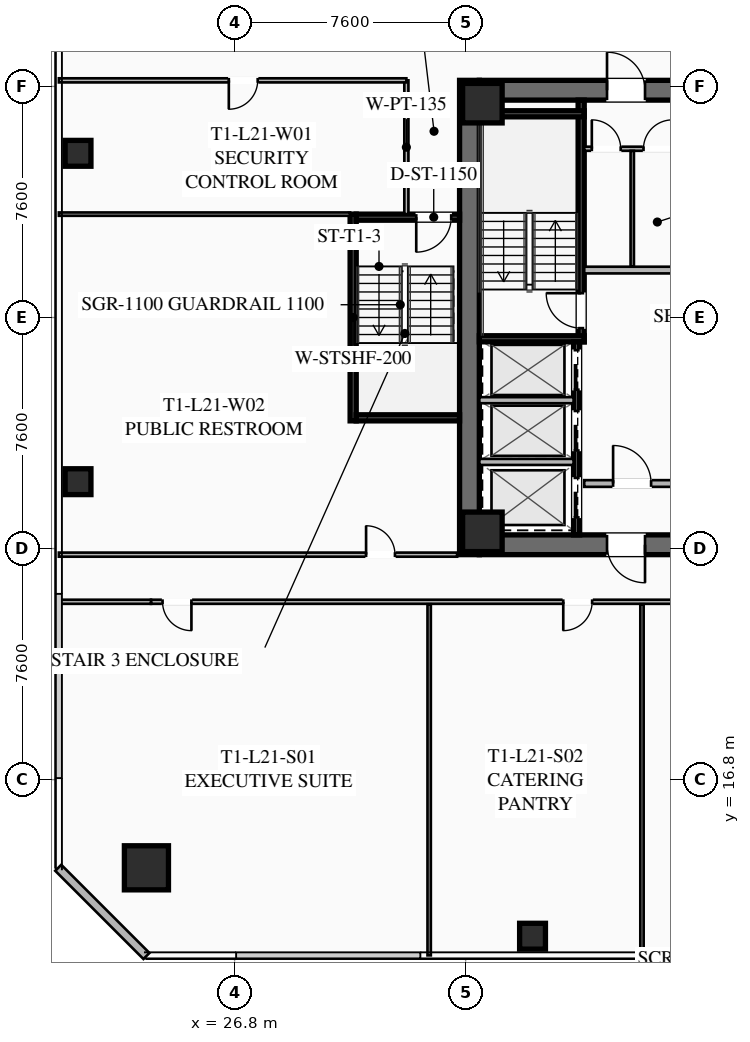
"""IFC4 building model, lengths in metres.
Left out: names, types, materials, properties, quantities, classifications, styles, units other than length and angle.
Written with IfcOpenShell. Run it as: python <this file> out.ifc"""

import sys

from ifc_helpers import new_model, si_unit, direction, frame, frame_2d, origin, origin_2d, place, context, subcontext, project, spatial, rectangle, hollow_rectangle, extrude, element, fill, save


model = new_model("IFC4")
c1 = context("Model", 3, precision=1e-05, world=origin(), true_north=direction((0.0, 1.0)))
c2 = subcontext(c1, "Body", "Model", "MODEL_VIEW")
j1 = project(units=[si_unit("LENGTHUNIT", "METRE"), si_unit("PLANEANGLEUNIT", "RADIAN")], contexts=[c1])
p1 = place(None, origin())
s1 = spatial("IfcSite", under=j1, at=p1, CompositionType="ELEMENT")
p2 = place(p1, origin())
s2 = spatial("IfcBuilding", under=s1, at=p2, CompositionType="ELEMENT")
p3 = place(p2, frame((0.0, 0.0, 81.4)))
s3 = spatial("IfcBuildingStorey", under=s2, at=p3, CompositionType="ELEMENT", Elevation=81.4)
p4 = place(p3, frame((34.525, 24.2, 0.0), z_axis=(0.0, 0.0, 1.0), x_axis=(0.0, 1.0, 0.0)))
e1 = element("IfcWall", 1, at=p4, inside=s3, PredefinedType="SHEAR", context=c2, shape_type="SweptSolid", body=[
    extrude(rectangle(XDim=15.6, YDim=0.65, at=frame_2d((7.8, 0.0))), origin(), (0.0, 0.0, 1.0), 3.55),
])
p5 = place(p3, frame((49.15, 24.525, 0.0), z_axis=(0.0, 0.0, 1.0), x_axis=(-1.0, 0.0, 0.0)))
e2 = element("IfcWall", 2, at=p5, inside=s3, PredefinedType="SHEAR", context=c2, shape_type="SweptSolid", body=[
    extrude(rectangle(XDim=14.3, YDim=0.65, at=frame_2d((7.15, 0.0))), origin(), (0.0, 0.0, 1.0), 3.55),
])
p6 = place(p5, frame((8.85, 0.0, 0.0)))
e3 = element("IfcOpeningElement", 3, at=p6, cuts=e2, PredefinedType="OPENING", context=c2, shape_type="SweptSolid", body=[
    extrude(rectangle(XDim=1.25, YDim=2.25, at=frame_2d((0.625, 1.125))), frame((0.0, 0.335, 0.0), z_axis=(0.0, -1.0, 0.0), x_axis=(1.0, 0.0, 0.0)), (0.0, 0.0, 1.0), 0.67),
])
p7 = place(p5, frame((3.8, 0.0, 0.0)))
e4 = element("IfcOpeningElement", 4, at=p7, cuts=e2, PredefinedType="OPENING", context=c2, shape_type="SweptSolid", body=[
    extrude(rectangle(XDim=1.25, YDim=2.25, at=frame_2d((0.625, 1.125))), frame((0.0, 0.335, 0.0), z_axis=(0.0, -1.0, 0.0), x_axis=(1.0, 0.0, 0.0)), (0.0, 0.0, 1.0), 0.67),
])
p8 = place(p3, frame((34.85, 39.475, 0.0), z_axis=(0.0, 0.0, 1.0), x_axis=(1.0, 0.0, 0.0)))
e5 = element("IfcWall", 5, at=p8, inside=s3, PredefinedType="SHEAR", context=c2, shape_type="SweptSolid", body=[
    extrude(rectangle(XDim=14.3, YDim=0.65, at=frame_2d((7.15, 0.0))), origin(), (0.0, 0.0, 1.0), 3.55),
])
p9 = place(p8, frame((4.2, 0.0, 0.0)))
e6 = element("IfcOpeningElement", 6, at=p9, cuts=e5, PredefinedType="OPENING", context=c2, shape_type="SweptSolid", body=[
    extrude(rectangle(XDim=1.25, YDim=2.25, at=frame_2d((0.625, 1.125))), frame((0.0, 0.335, 0.0), z_axis=(0.0, -1.0, 0.0), x_axis=(1.0, 0.0, 0.0)), (0.0, 0.0, 1.0), 0.67),
])
p10 = place(p8, frame((9.25, 0.0, 0.0)))
e7 = element("IfcOpeningElement", 7, at=p10, cuts=e5, PredefinedType="OPENING", context=c2, shape_type="SweptSolid", body=[
    extrude(rectangle(XDim=1.25, YDim=2.25, at=frame_2d((0.625, 1.125))), frame((0.0, 0.335, 0.0), z_axis=(0.0, -1.0, 0.0), x_axis=(1.0, 0.0, 0.0)), (0.0, 0.0, 1.0), 0.67),
])
for number, where, z_axis, x_axis in (
    (8, (34.95, 24.95, 0.0), (0.0, 0.0, 1.0), (1.0, 0.0, 0.0)),
    (9, (34.95, 39.05, 0.0), (0.0, 0.0, 1.0), (1.0, 0.0, 0.0)),
):
    element("IfcColumn", number, at=place(p3, frame(where, z_axis=z_axis, x_axis=x_axis)), inside=s3, PredefinedType="COLUMN", context=c2, shape_type="SweptSolid", body=[
        extrude(hollow_rectangle(XDim=1.3, YDim=1.3, WallThickness=0.05, at=origin_2d()), origin(), (0.0, 0.0, 1.0), 3.35),
    ])
p11 = place(p3, frame((23.9, 13.9, 0.0), z_axis=(0.0, 0.0, 1.0), x_axis=(1.0, 0.0, 0.0)))
e10 = element("IfcColumn", 10, at=p11, inside=s3, PredefinedType="COLUMN", context=c2, shape_type="SweptSolid", body=[
    extrude(hollow_rectangle(XDim=1.45, YDim=1.45, WallThickness=0.055, at=origin_2d()), origin(), (0.0, 0.0, 1.0), 3.35),
])
for number, where, z_axis, x_axis in (
    (11, (36.6, 11.65, 0.0), (0.0, 0.0, 1.0), (1.0, 0.0, 0.0)),
    (12, (21.65, 37.4, 0.0), (0.0, 0.0, 1.0), (1.0, 0.0, 0.0)),
    (13, (21.65, 26.6, 0.0), (0.0, 0.0, 1.0), (1.0, 0.0, 0.0)),
):
    element("IfcColumn", number, at=place(p3, frame(where, z_axis=z_axis, x_axis=x_axis)), inside=s3, PredefinedType="COLUMN", context=c2, shape_type="SweptSolid", body=[
        extrude(hollow_rectangle(XDim=0.85, YDim=0.85, WallThickness=0.035, at=origin_2d()), origin(), (0.0, 0.0, 1.0), 3.35),
    ])
p12 = place(p3, frame((23.9, 11.0, 0.0), z_axis=(0.0, 0.0, 1.0), x_axis=(-0.707106781187, 0.707106781187, 0.0)))
e14 = element("IfcWall", 14, at=p12, inside=s3, PredefinedType="SOLIDWALL", context=c2, shape_type="SweptSolid", body=[
    extrude(rectangle(XDim=4.101, YDim=0.28, at=frame_2d((2.051, 0.0))), origin(), (0.0, 0.0, 1.0), 3.35),
])
p13 = place(p3, frame((38.2, 31.2, 0.0), z_axis=(0.0, 0.0, 1.0), x_axis=(0.0, 1.0, 0.0)))
e15 = element("IfcWall", 15, at=p13, inside=s3, PredefinedType="SHEAR", context=c2, shape_type="SweptSolid", body=[
    extrude(rectangle(XDim=7.95, YDim=0.2, at=frame_2d((3.975, 0.0))), origin(), (0.0, 0.0, 1.0), 3.35),
])
p14 = place(p13, frame((0.45, 0.0, 0.0)))
e16 = element("IfcOpeningElement", 16, at=p14, cuts=e15, PredefinedType="OPENING", context=c2, shape_type="SweptSolid", body=[
    extrude(rectangle(XDim=1.15, YDim=2.2, at=frame_2d((0.575, 1.1))), frame((0.0, 0.11, 0.0), z_axis=(0.0, -1.0, 0.0), x_axis=(1.0, 0.0, 0.0)), (0.0, 0.0, 1.0), 0.22),
])
for number, where, z_axis, x_axis in (
    (17, (34.85, 31.3, 0.0), (0.0, 0.0, 1.0), (1.0, 0.0, 0.0)),
    (18, (34.85, 38.7, 0.0), (0.0, 0.0, 1.0), (1.0, 0.0, 0.0)),
):
    element("IfcWall", number, at=place(p3, frame(where, z_axis=z_axis, x_axis=x_axis)), inside=s3, PredefinedType="SHEAR", context=c2, shape_type="SweptSolid", body=[
        extrude(rectangle(XDim=3.45, YDim=0.2, at=frame_2d((1.725, 0.0))), origin(), (0.0, 0.0, 1.0), 3.35),
    ])
p15 = place(p3, frame((38.3, 33.56, 0.0), z_axis=(0.0, 0.0, 1.0), x_axis=(1.0, 0.0, 0.0)))
e19 = element("IfcWall", 19, at=p15, inside=s3, PredefinedType="SOLIDWALL", context=c2, shape_type="SweptSolid", body=[
    extrude(rectangle(XDim=3.15, YDim=0.22, at=frame_2d((1.575, 0.0))), origin(), (0.0, 0.0, 1.0), 2.703),
])
p16 = place(p3, frame((38.3, 26.54, 0.0), z_axis=(0.0, 0.0, 1.0), x_axis=(1.0, 0.0, 0.0)))
e20 = element("IfcWall", 20, at=p16, inside=s3, PredefinedType="SOLIDWALL", context=c2, shape_type="SweptSolid", body=[
    extrude(rectangle(XDim=3.15, YDim=0.22, at=frame_2d((1.575, 0.0))), origin(), (0.0, 0.0, 1.0), 2.703),
])
p17 = place(p16, frame((0.95, 0.0, 0.0)))
e21 = element("IfcOpeningElement", 21, at=p17, cuts=e20, PredefinedType="OPENING", context=c2, shape_type="SweptSolid", body=[
    extrude(rectangle(XDim=1.25, YDim=2.25, at=frame_2d((0.625, 1.125))), frame((0.0, 0.12, 0.0), z_axis=(0.0, -1.0, 0.0), x_axis=(1.0, 0.0, 0.0)), (0.0, 0.0, 1.0), 0.24),
])
p18 = place(p3, frame((38.05, 24.85, 0.0), z_axis=(0.0, 0.0, 1.0), x_axis=(0.0, 1.0, 0.0)))
e22 = element("IfcWall", 22, at=p18, inside=s3, PredefinedType="SHEAR", context=c2, shape_type="SweptSolid", body=[
    extrude(rectangle(XDim=6.35, YDim=0.2, at=frame_2d((3.175, 0.0))), origin(), (0.0, 0.0, 1.0), 3.35),
])
p19 = place(p18, frame((4.775, 0.0, 0.0)))
e23 = element("IfcOpeningElement", 23, at=p19, cuts=e22, PredefinedType="OPENING", context=c2, shape_type="SweptSolid", body=[
    extrude(rectangle(XDim=1.3, YDim=2.25, at=frame_2d((0.65, 1.125))), frame((0.0, 0.11, 0.0), z_axis=(0.0, -1.0, 0.0), x_axis=(1.0, 0.0, 0.0)), (0.0, 0.0, 1.0), 0.22),
])
p20 = place(p18, frame((2.775, 0.0, 0.0)))
e24 = element("IfcOpeningElement", 24, at=p20, cuts=e22, PredefinedType="OPENING", context=c2, shape_type="SweptSolid", body=[
    extrude(rectangle(XDim=1.3, YDim=2.25, at=frame_2d((0.65, 1.125))), frame((0.0, 0.11, 0.0), z_axis=(0.0, -1.0, 0.0), x_axis=(1.0, 0.0, 0.0)), (0.0, 0.0, 1.0), 0.22),
])
p21 = place(p18, frame((0.575, 0.0, 0.0)))
e25 = element("IfcOpeningElement", 25, at=p21, cuts=e22, PredefinedType="OPENING", context=c2, shape_type="SweptSolid", body=[
    extrude(rectangle(XDim=1.3, YDim=2.25, at=frame_2d((0.65, 1.125))), frame((0.0, 0.11, 0.0), z_axis=(0.0, -1.0, 0.0), x_axis=(1.0, 0.0, 0.0)), (0.0, 0.0, 1.0), 0.22),
])
for number, where, z_axis, x_axis in (
    (26, (34.85, 27.25, 0.0), (0.0, 0.0, 1.0), (1.0, 0.0, 0.0)),
    (27, (34.85, 29.28, 0.0), (0.0, 0.0, 1.0), (1.0, 0.0, 0.0)),
):
    element("IfcWall", number, at=place(p3, frame(where, z_axis=z_axis, x_axis=x_axis)), inside=s3, PredefinedType="SOLIDWALL", context=c2, shape_type="SweptSolid", body=[
        extrude(rectangle(XDim=3.1, YDim=0.2, at=frame_2d((1.55, 0.0))), origin(), (0.0, 0.0, 1.0), 3.35),
    ])
p22 = place(p3, frame((38.3, 37.55, 0.0), z_axis=(0.0, 0.0, 1.0), x_axis=(1.0, 0.0, 0.0)))
e28 = element("IfcWall", 28, at=p22, inside=s3, PredefinedType="PARTITIONING", context=c2, shape_type="SweptSolid", body=[
    extrude(rectangle(XDim=3.15, YDim=0.135, at=frame_2d((1.575, 0.0))), origin(), (0.0, 0.0, 1.0), 2.703),
])
p23 = place(p22, frame((0.25, 0.0, 0.0)))
e29 = element("IfcOpeningElement", 29, at=p23, cuts=e28, PredefinedType="OPENING", context=c2, shape_type="SweptSolid", body=[
    extrude(rectangle(XDim=0.95, YDim=2.05, at=frame_2d((0.475, 1.025))), frame((0.0, 0.077, 0.0), z_axis=(0.0, -1.0, 0.0), x_axis=(1.0, 0.0, 0.0)), (0.0, 0.0, 1.0), 0.155),
])
p24 = place(p22, frame((1.95, 0.0, 0.0)))
e30 = element("IfcOpeningElement", 30, at=p24, cuts=e28, PredefinedType="OPENING", context=c2, shape_type="SweptSolid", body=[
    extrude(rectangle(XDim=0.95, YDim=2.05, at=frame_2d((0.475, 1.025))), frame((0.0, 0.077, 0.0), z_axis=(0.0, -1.0, 0.0), x_axis=(1.0, 0.0, 0.0)), (0.0, 0.0, 1.0), 0.155),
])
p25 = place(p3, frame((39.88, 33.68, 0.0), z_axis=(0.0, 0.0, 1.0), x_axis=(0.0, 1.0, 0.0)))
e31 = element("IfcWall", 31, at=p25, inside=s3, PredefinedType="PARTITIONING", context=c2, shape_type="SweptSolid", body=[
    extrude(rectangle(XDim=3.8, YDim=0.11, at=frame_2d((1.9, 0.0))), origin(), (0.0, 0.0, 1.0), 2.703),
])
p26 = place(p3, frame((30.7, 28.6, 0.0), z_axis=(0.0, 0.0, 1.0), x_axis=(0.0, 1.0, 0.0)))
e32 = element("IfcWall", 32, at=p26, inside=s3, PredefinedType="SHEAR", context=c2, shape_type="SweptSolid", body=[
    extrude(rectangle(XDim=6.8, YDim=0.2, at=frame_2d((3.4, 0.0))), origin(), (0.0, 0.0, 1.0), 3.35),
])
p27 = place(p3, frame((34.2, 35.3, 0.0), z_axis=(0.0, 0.0, 1.0), x_axis=(-1.0, 0.0, 0.0)))
e33 = element("IfcWall", 33, at=p27, inside=s3, PredefinedType="SHEAR", context=c2, shape_type="SweptSolid", body=[
    extrude(rectangle(XDim=3.4, YDim=0.2, at=frame_2d((1.7, 0.0))), origin(), (0.0, 0.0, 1.0), 3.35),
])
p28 = place(p27, frame((0.275, 0.0, 0.0)))
e34 = element("IfcOpeningElement", 34, at=p28, cuts=e33, PredefinedType="OPENING", context=c2, shape_type="SweptSolid", body=[
    extrude(rectangle(XDim=1.15, YDim=2.2, at=frame_2d((0.575, 1.1))), frame((0.0, 0.11, 0.0), z_axis=(0.0, -1.0, 0.0), x_axis=(1.0, 0.0, 0.0)), (0.0, 0.0, 1.0), 0.22),
])
p29 = place(p3, frame((30.8, 28.7, 0.0), z_axis=(0.0, 0.0, 1.0), x_axis=(1.0, 0.0, 0.0)))
e35 = element("IfcWall", 35, at=p29, inside=s3, PredefinedType="SHEAR", context=c2, shape_type="SweptSolid", body=[
    extrude(rectangle(XDim=3.4, YDim=0.2, at=frame_2d((1.7, 0.0))), origin(), (0.0, 0.0, 1.0), 3.35),
])
p30 = place(p3, frame((32.45, 35.4, 0.0), z_axis=(0.0, 0.0, 1.0), x_axis=(0.0, 1.0, 0.0)))
e36 = element("IfcWall", 36, at=p30, inside=s3, PredefinedType="PARTITIONING", context=c2, shape_type="SweptSolid", body=[
    extrude(rectangle(XDim=4.4, YDim=0.135, at=frame_2d((2.2, 0.0))), origin(), (0.0, 0.0, 1.0), 2.703),
])
p31 = place(p3, frame((51.35, 22.65, 0.0), z_axis=(0.0, 0.0, 1.0), x_axis=(-1.0, 0.0, 0.0)))
e37 = element("IfcWall", 37, at=p31, inside=s3, PredefinedType="PARTITIONING", context=c2, shape_type="SweptSolid", body=[
    extrude(rectangle(XDim=27.3, YDim=0.135, at=frame_2d((13.65, 0.0))), origin(), (0.0, 0.0, 1.0), 2.703),
])
p32 = place(p31, frame((25.97, 0.0, 0.0)))
e38 = element("IfcOpeningElement", 38, at=p32, cuts=e37, PredefinedType="OPENING", context=c2, shape_type="SweptSolid", body=[
    extrude(rectangle(XDim=0.95, YDim=2.05, at=frame_2d((0.475, 1.025))), frame((0.0, 0.077, 0.0), z_axis=(0.0, -1.0, 0.0), x_axis=(1.0, 0.0, 0.0)), (0.0, 0.0, 1.0), 0.155),
])
p33 = place(p31, frame((12.79, 0.0, 0.0)))
e39 = element("IfcOpeningElement", 39, at=p33, cuts=e37, PredefinedType="OPENING", context=c2, shape_type="SweptSolid", body=[
    extrude(rectangle(XDim=0.95, YDim=2.05, at=frame_2d((0.475, 1.025))), frame((0.0, 0.077, 0.0), z_axis=(0.0, -1.0, 0.0), x_axis=(1.0, 0.0, 0.0)), (0.0, 0.0, 1.0), 0.155),
])
p34 = place(p31, frame((8.798, 0.0, 0.0)))
e40 = element("IfcOpeningElement", 40, at=p34, cuts=e37, PredefinedType="OPENING", context=c2, shape_type="SweptSolid", body=[
    extrude(rectangle(XDim=0.95, YDim=2.05, at=frame_2d((0.475, 1.025))), frame((0.0, 0.077, 0.0), z_axis=(0.0, -1.0, 0.0), x_axis=(1.0, 0.0, 0.0)), (0.0, 0.0, 1.0), 0.155),
])
p35 = place(p31, frame((0.38, 0.0, 0.0)))
e41 = element("IfcOpeningElement", 41, at=p35, cuts=e37, PredefinedType="OPENING", context=c2, shape_type="SweptSolid", body=[
    extrude(rectangle(XDim=0.95, YDim=2.05, at=frame_2d((0.475, 1.025))), frame((0.0, 0.077, 0.0), z_axis=(0.0, -1.0, 0.0), x_axis=(1.0, 0.0, 0.0)), (0.0, 0.0, 1.0), 0.155),
])
p36 = place(p3, frame((21.02, 22.65, 0.0), z_axis=(0.0, 0.0, 1.0), x_axis=(1.0, 0.0, 0.0)))
e42 = element("IfcWall", 42, at=p36, inside=s3, PredefinedType="PARTITIONING", context=c2, shape_type="SweptSolid", body=[
    extrude(rectangle(XDim=3.03, YDim=0.135, at=frame_2d((1.515, 0.0))), origin(), (0.0, 0.0, 1.0), 2.703),
])
for number, where, z_axis, x_axis in (
    (43, (33.2, 11.02, 0.0), (0.0, 0.0, 1.0), (0.0, 1.0, 0.0)),
    (44, (40.2, 11.02, 0.0), (0.0, 0.0, 1.0), (0.0, 1.0, 0.0)),
):
    element("IfcWall", number, at=place(p3, frame(where, z_axis=z_axis, x_axis=x_axis)), inside=s3, PredefinedType="PARTITIONING", context=c2, shape_type="SweptSolid", body=[
        extrude(rectangle(XDim=11.55, YDim=0.11, at=frame_2d((5.775, 0.0))), origin(), (0.0, 0.0, 1.0), 2.703),
    ])
p37 = place(p3, frame((32.45, 39.8, 0.0), z_axis=(0.0, 0.0, 1.0), x_axis=(-1.0, 0.0, 0.0)))
e45 = element("IfcWall", 45, at=p37, inside=s3, PredefinedType="PARTITIONING", context=c2, shape_type="SweptSolid", body=[
    extrude(rectangle(XDim=11.43, YDim=0.135, at=frame_2d((5.715, 0.0))), origin(), (0.0, 0.0, 1.0), 2.703),
])
p38 = place(p37, frame((4.89, 0.0, 0.0)))
e46 = element("IfcOpeningElement", 46, at=p38, cuts=e45, PredefinedType="OPENING", context=c2, shape_type="SweptSolid", body=[
    extrude(rectangle(XDim=0.95, YDim=2.05, at=frame_2d((0.475, 1.025))), frame((0.0, 0.077, 0.0), z_axis=(0.0, -1.0, 0.0), x_axis=(1.0, 0.0, 0.0)), (0.0, 0.0, 1.0), 0.155),
])
p39 = place(p3, frame((21.02, 24.2, 0.0), z_axis=(0.0, 0.0, 1.0), x_axis=(1.0, 0.0, 0.0)))
e47 = element("IfcWall", 47, at=p39, inside=s3, PredefinedType="PARTITIONING", context=c2, shape_type="SweptSolid", body=[
    extrude(rectangle(XDim=13.1, YDim=0.135, at=frame_2d((6.55, 0.0))), origin(), (0.0, 0.0, 1.0), 2.703),
])
p40 = place(p39, frame((10.105, 0.0, 0.0)))
e48 = element("IfcOpeningElement", 48, at=p40, cuts=e47, PredefinedType="OPENING", context=c2, shape_type="SweptSolid", body=[
    extrude(rectangle(XDim=0.95, YDim=2.05, at=frame_2d((0.475, 1.025))), frame((0.0, 0.077, 0.0), z_axis=(0.0, -1.0, 0.0), x_axis=(1.0, 0.0, 0.0)), (0.0, 0.0, 1.0), 0.155),
])
p41 = place(p3, frame((30.6, 35.4, 0.0), z_axis=(0.0, 0.0, 1.0), x_axis=(-1.0, 0.0, 0.0)))
e49 = element("IfcWall", 49, at=p41, inside=s3, PredefinedType="PARTITIONING", context=c2, shape_type="SweptSolid", body=[
    extrude(rectangle(XDim=9.58, YDim=0.11, at=frame_2d((4.79, 0.0))), origin(), (0.0, 0.0, 1.0), 2.703),
])
p42 = place(p9, origin())
e50 = element("IfcDoor", 50, at=p42, inside=s3, OperationType="SINGLE_SWING_LEFT", PredefinedType="DOOR", context=c2, shape_type="SweptSolid", body=[
    extrude(rectangle(XDim=1.25, YDim=2.25, at=frame_2d((0.625, 1.125))), frame((0.0, 0.025, 0.0), z_axis=(0.0, -1.0, 0.0), x_axis=(1.0, 0.0, 0.0)), (0.0, 0.0, 1.0), 0.05),
])
fill(e6, e50)
p43 = place(p6, origin())
e51 = element("IfcDoor", 51, at=p43, inside=s3, OperationType="SINGLE_SWING_LEFT", PredefinedType="DOOR", context=c2, shape_type="SweptSolid", body=[
    extrude(rectangle(XDim=1.25, YDim=2.25, at=frame_2d((0.625, 1.125))), frame((0.0, 0.025, 0.0), z_axis=(0.0, -1.0, 0.0), x_axis=(1.0, 0.0, 0.0)), (0.0, 0.0, 1.0), 0.05),
])
fill(e3, e51)
p44 = place(p14, origin())
e52 = element("IfcDoor", 52, at=p44, inside=s3, OperationType="SINGLE_SWING_RIGHT", PredefinedType="DOOR", context=c2, shape_type="SweptSolid", body=[
    extrude(rectangle(XDim=1.15, YDim=2.2, at=frame_2d((0.575, 1.1))), frame((0.0, 0.025, 0.0), z_axis=(0.0, -1.0, 0.0), x_axis=(1.0, 0.0, 0.0)), (0.0, 0.0, 1.0), 0.05),
])
fill(e16, e52)
p45 = place(p17, origin())
e53 = element("IfcDoor", 53, at=p45, inside=s3, OperationType="SINGLE_SWING_LEFT", PredefinedType="DOOR", context=c2, shape_type="SweptSolid", body=[
    extrude(rectangle(XDim=1.25, YDim=2.25, at=frame_2d((0.625, 1.125))), frame((0.0, 0.025, 0.0), z_axis=(0.0, -1.0, 0.0), x_axis=(1.0, 0.0, 0.0)), (0.0, 0.0, 1.0), 0.05),
])
fill(e21, e53)
p46 = place(p23, origin())
e54 = element("IfcDoor", 54, at=p46, inside=s3, OperationType="SINGLE_SWING_LEFT", PredefinedType="DOOR", context=c2, shape_type="SweptSolid", body=[
    extrude(rectangle(XDim=0.95, YDim=2.05, at=frame_2d((0.475, 1.025))), frame((0.0, 0.025, 0.0), z_axis=(0.0, -1.0, 0.0), x_axis=(1.0, 0.0, 0.0)), (0.0, 0.0, 1.0), 0.05),
])
fill(e29, e54)
p47 = place(p24, origin())
e55 = element("IfcDoor", 55, at=p47, inside=s3, OperationType="SINGLE_SWING_RIGHT", PredefinedType="DOOR", context=c2, shape_type="SweptSolid", body=[
    extrude(rectangle(XDim=0.95, YDim=2.05, at=frame_2d((0.475, 1.025))), frame((0.0, 0.025, 0.0), z_axis=(0.0, -1.0, 0.0), x_axis=(1.0, 0.0, 0.0)), (0.0, 0.0, 1.0), 0.05),
])
fill(e30, e55)
p48 = place(p28, origin())
e56 = element("IfcDoor", 56, at=p48, inside=s3, OperationType="SINGLE_SWING_RIGHT", PredefinedType="DOOR", context=c2, shape_type="SweptSolid", body=[
    extrude(rectangle(XDim=1.15, YDim=2.2, at=frame_2d((0.575, 1.1))), frame((0.0, 0.025, 0.0), z_axis=(0.0, -1.0, 0.0), x_axis=(1.0, 0.0, 0.0)), (0.0, 0.0, 1.0), 0.05),
])
fill(e34, e56)
p49 = place(p32, origin())
e57 = element("IfcDoor", 57, at=p49, inside=s3, OperationType="SINGLE_SWING_LEFT", PredefinedType="DOOR", context=c2, shape_type="SweptSolid", body=[
    extrude(rectangle(XDim=0.95, YDim=2.05, at=frame_2d((0.475, 1.025))), frame((0.0, 0.025, 0.0), z_axis=(0.0, -1.0, 0.0), x_axis=(1.0, 0.0, 0.0)), (0.0, 0.0, 1.0), 0.05),
])
fill(e38, e57)
p50 = place(p33, origin())
e58 = element("IfcDoor", 58, at=p50, inside=s3, OperationType="SINGLE_SWING_RIGHT", PredefinedType="DOOR", context=c2, shape_type="SweptSolid", body=[
    extrude(rectangle(XDim=0.95, YDim=2.05, at=frame_2d((0.475, 1.025))), frame((0.0, 0.025, 0.0), z_axis=(0.0, -1.0, 0.0), x_axis=(1.0, 0.0, 0.0)), (0.0, 0.0, 1.0), 0.05),
])
fill(e39, e58)
p51 = place(p38, origin())
e59 = element("IfcDoor", 59, at=p51, inside=s3, OperationType="SINGLE_SWING_RIGHT", PredefinedType="DOOR", context=c2, shape_type="SweptSolid", body=[
    extrude(rectangle(XDim=0.95, YDim=2.05, at=frame_2d((0.475, 1.025))), frame((0.0, 0.025, 0.0), z_axis=(0.0, -1.0, 0.0), x_axis=(1.0, 0.0, 0.0)), (0.0, 0.0, 1.0), 0.05),
])
fill(e46, e59)
p52 = place(p40, origin())
e60 = element("IfcDoor", 60, at=p52, inside=s3, OperationType="SINGLE_SWING_LEFT", PredefinedType="DOOR", context=c2, shape_type="SweptSolid", body=[
    extrude(rectangle(XDim=0.95, YDim=2.05, at=frame_2d((0.475, 1.025))), frame((0.0, 0.025, 0.0), z_axis=(0.0, -1.0, 0.0), x_axis=(1.0, 0.0, 0.0)), (0.0, 0.0, 1.0), 0.05),
])
fill(e48, e60)
p53 = place(p19, origin())
e61 = element("IfcDoor", 61, at=p53, inside=s3, OperationType="SLIDING_TO_LEFT", PredefinedType="DOOR", context=c2, shape_type="SweptSolid", body=[
    extrude(rectangle(XDim=1.3, YDim=2.25, at=frame_2d((0.65, 1.125))), frame((0.0, 0.025, 0.0), z_axis=(0.0, -1.0, 0.0), x_axis=(1.0, 0.0, 0.0)), (0.0, 0.0, 1.0), 0.05),
])
fill(e23, e61)
p54 = place(p20, origin())
e62 = element("IfcDoor", 62, at=p54, inside=s3, OperationType="SLIDING_TO_LEFT", PredefinedType="DOOR", context=c2, shape_type="SweptSolid", body=[
    extrude(rectangle(XDim=1.3, YDim=2.25, at=frame_2d((0.65, 1.125))), frame((0.0, 0.025, 0.0), z_axis=(0.0, -1.0, 0.0), x_axis=(1.0, 0.0, 0.0)), (0.0, 0.0, 1.0), 0.05),
])
fill(e24, e62)
p55 = place(p21, origin())
e63 = element("IfcDoor", 63, at=p55, inside=s3, OperationType="SLIDING_TO_LEFT", PredefinedType="DOOR", context=c2, shape_type="SweptSolid", body=[
    extrude(rectangle(XDim=1.3, YDim=2.25, at=frame_2d((0.65, 1.125))), frame((0.0, 0.025, 0.0), z_axis=(0.0, -1.0, 0.0), x_axis=(1.0, 0.0, 0.0)), (0.0, 0.0, 1.0), 0.05),
])
fill(e25, e63)
save(model, sys.argv[1])
